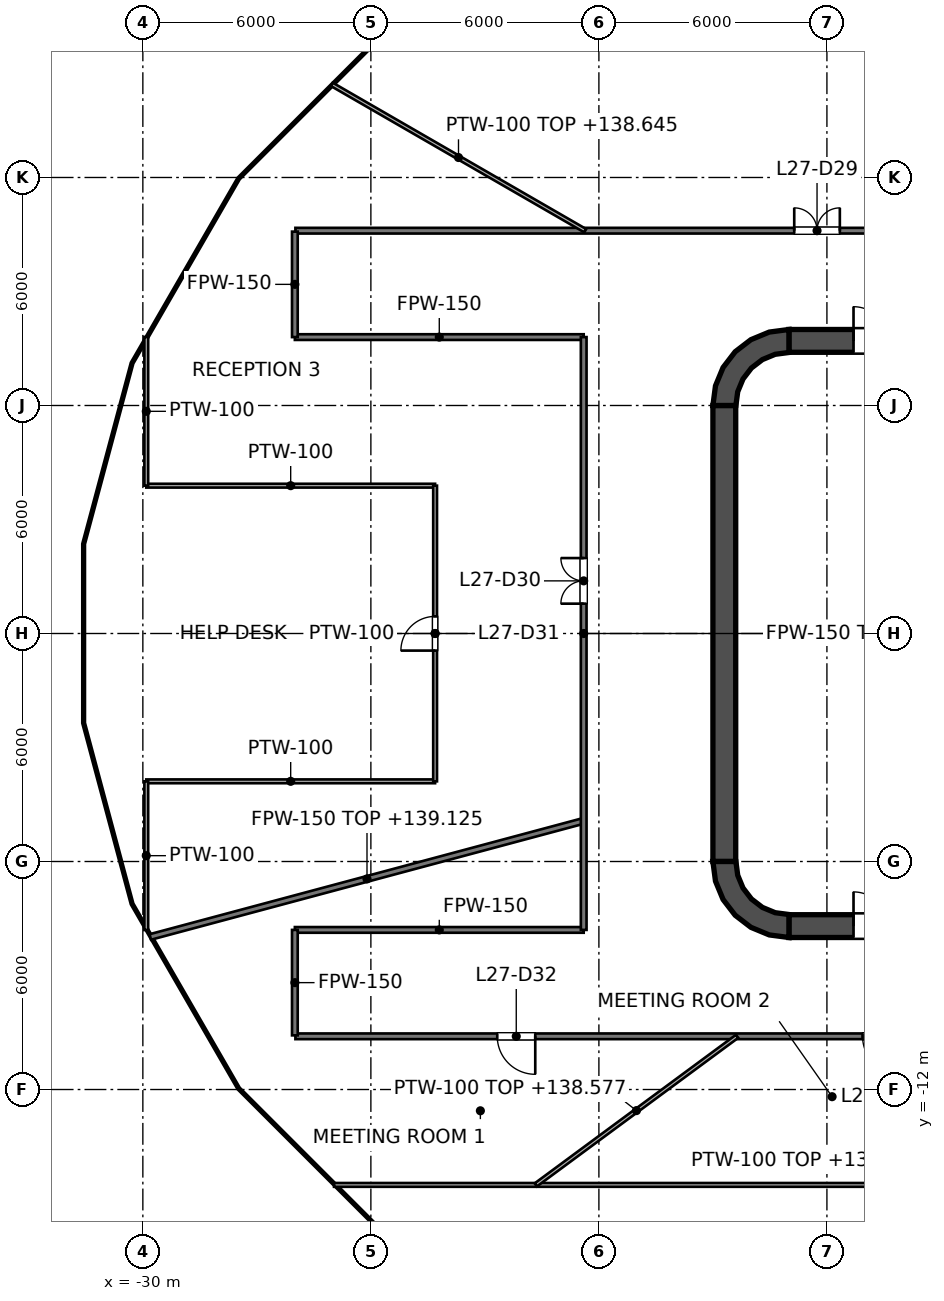
"""IFC4 building model, lengths in metres.
Left out: names, types, materials, properties, quantities, classifications, styles, units other than length and angle.
Written with IfcOpenShell. Run it as: python <this file> out.ifc"""

import sys

from ifc_helpers import new_model, si_unit, direction, frame, frame_2d, origin, place, context, subcontext, project, spatial, polyline, rectangle, outline, extrude, element, fill, save


model = new_model("IFC4")
c1 = context("Model", 3, precision=1e-05, world=origin(), true_north=direction((0.0, 1.0)))
c2 = subcontext(c1, "Body", "Model", "MODEL_VIEW")
j1 = project(units=[si_unit("LENGTHUNIT", "METRE"), si_unit("PLANEANGLEUNIT", "RADIAN")], contexts=[c1])
p1 = place(None, origin())
s1 = spatial("IfcSite", under=j1, at=p1, CompositionType="ELEMENT")
p2 = place(p1, origin())
s2 = spatial("IfcBuilding", under=s1, at=p2, CompositionType="ELEMENT")
p3 = place(p2, frame((0.0, 0.0, 135.6)))
s3 = spatial("IfcBuildingStorey", under=s2, at=p3, CompositionType="ELEMENT", Elevation=135.6)
p4 = place(p3, frame((-13.0, 7.7, 0.0), z_axis=(0.0, 0.0, 1.0), x_axis=(1.0, 0.0, 0.0)))
e1 = element("IfcWall", 1, at=p4, inside=s3, PredefinedType="SHEAR", context=c2, shape_type="SweptSolid", body=[
    extrude(rectangle(XDim=26.0, YDim=0.6, at=frame_2d((13.0, 0.0))), origin(), (0.0, 0.0, 1.0), 4.2),
])
p5 = place(p4, frame((1.7, 0.0, 0.0)))
e2 = element("IfcOpeningElement", 2, at=p5, cuts=e1, PredefinedType="OPENING", context=c2, shape_type="SweptSolid", body=[
    extrude(rectangle(XDim=1.8, YDim=2.1, at=frame_2d((0.9, 1.05))), frame((0.0, 0.3, 0.0), z_axis=(0.0, -1.0, 0.0), x_axis=(1.0, 0.0, 0.0)), (0.0, 0.0, 1.0), 0.6),
])
p6 = place(p4, frame((22.5, 0.0, 0.0)))
e3 = element("IfcOpeningElement", 3, at=p6, cuts=e1, PredefinedType="OPENING", context=c2, shape_type="SweptSolid", body=[
    extrude(rectangle(XDim=1.8, YDim=2.1, at=frame_2d((0.9, 1.05))), frame((0.0, 0.3, 0.0), z_axis=(0.0, -1.0, 0.0), x_axis=(1.0, 0.0, 0.0)), (0.0, 0.0, 1.0), 0.6),
])
p7 = place(p3, frame((-13.0, -7.7, 0.0), z_axis=(0.0, 0.0, 1.0), x_axis=(1.0, 0.0, 0.0)))
e4 = element("IfcWall", 4, at=p7, inside=s3, PredefinedType="SHEAR", context=c2, shape_type="SweptSolid", body=[
    extrude(rectangle(XDim=26.0, YDim=0.6, at=frame_2d((13.0, 0.0))), origin(), (0.0, 0.0, 1.0), 4.2),
])
p8 = place(p7, frame((1.7, 0.0, 0.0)))
e5 = element("IfcOpeningElement", 5, at=p8, cuts=e4, PredefinedType="OPENING", context=c2, shape_type="SweptSolid", body=[
    extrude(rectangle(XDim=1.8, YDim=2.1, at=frame_2d((0.9, 1.05))), frame((0.0, 0.3, 0.0), z_axis=(0.0, -1.0, 0.0), x_axis=(1.0, 0.0, 0.0)), (0.0, 0.0, 1.0), 0.6),
])
p9 = place(p7, frame((22.5, 0.0, 0.0)))
e6 = element("IfcOpeningElement", 6, at=p9, cuts=e4, PredefinedType="OPENING", context=c2, shape_type="SweptSolid", body=[
    extrude(rectangle(XDim=1.8, YDim=2.1, at=frame_2d((0.9, 1.05))), frame((0.0, 0.3, 0.0), z_axis=(0.0, -1.0, 0.0), x_axis=(1.0, 0.0, 0.0)), (0.0, 0.0, 1.0), 0.6),
])
p10 = place(p3, frame((-14.7, -6.0, 0.0), z_axis=(0.0, 0.0, 1.0), x_axis=(0.0, 1.0, 0.0)))
e7 = element("IfcWall", 7, at=p10, inside=s3, PredefinedType="SHEAR", context=c2, shape_type="SweptSolid", body=[
    extrude(rectangle(XDim=12.0, YDim=0.6, at=frame_2d((6.0, 0.0))), origin(), (0.0, 0.0, 1.0), 4.2),
])
p11 = place(p3, origin())
e8 = element("IfcWall", 8, at=p11, inside=s3, PredefinedType="SHEAR", context=c2, shape_type="SweptSolid", body=[
    extrude(outline(polyline([(-15.0, 6.0), (-14.395, 6.0), (-14.347, 6.361), (-14.208, 6.698), (-13.986, 6.986), (-13.698, 7.208), (-13.361, 7.347), (-13.0, 7.395), (-13.0, 8.0), (-13.518, 7.932), (-14.0, 7.732), (-14.414, 7.414), (-14.732, 7.0), (-14.932, 6.518), (-15.0, 6.0)])), origin(), (0.0, 0.0, 1.0), 4.2),
])
e9 = element("IfcWall", 9, at=p11, inside=s3, PredefinedType="SHEAR", context=c2, shape_type="SweptSolid", body=[
    extrude(outline(polyline([(-13.0, -8.0), (-13.0, -7.395), (-13.361, -7.347), (-13.698, -7.208), (-13.986, -6.986), (-14.208, -6.698), (-14.347, -6.361), (-14.395, -6.0), (-15.0, -6.0), (-14.932, -6.518), (-14.732, -7.0), (-14.414, -7.414), (-14.0, -7.732), (-13.518, -7.932), (-13.0, -8.0)])), origin(), (0.0, 0.0, 1.0), 4.2),
])
p12 = place(p3, frame((-11.8, -7.4, 0.0), z_axis=(0.0, 0.0, 1.0), x_axis=(0.0, 1.0, 0.0)))
e10 = element("IfcWall", 10, at=p12, inside=s3, PredefinedType="SOLIDWALL", context=c2, shape_type="SweptSolid", body=[
    extrude(rectangle(XDim=14.8, YDim=0.4, at=frame_2d((7.4, 0.0))), origin(), (0.0, 0.0, 1.0), 4.05),
])
p13 = place(p12, frame((11.2, 0.0, 0.0)))
e11 = element("IfcOpeningElement", 11, at=p13, cuts=e10, PredefinedType="OPENING", context=c2, shape_type="SweptSolid", body=[
    extrude(rectangle(XDim=1.1, YDim=2.1, at=frame_2d((0.55, 1.05))), frame((0.0, 0.2, 0.0), z_axis=(0.0, -1.0, 0.0), x_axis=(1.0, 0.0, 0.0)), (0.0, 0.0, 1.0), 0.4),
])
p14 = place(p12, frame((8.3, 0.0, 0.0)))
e12 = element("IfcOpeningElement", 12, at=p14, cuts=e10, PredefinedType="OPENING", context=c2, shape_type="SweptSolid", body=[
    extrude(rectangle(XDim=1.1, YDim=2.1, at=frame_2d((0.55, 1.05))), frame((0.0, 0.2, 0.0), z_axis=(0.0, -1.0, 0.0), x_axis=(1.0, 0.0, 0.0)), (0.0, 0.0, 1.0), 0.4),
])
p15 = place(p12, frame((5.4, 0.0, 0.0)))
e13 = element("IfcOpeningElement", 13, at=p15, cuts=e10, PredefinedType="OPENING", context=c2, shape_type="SweptSolid", body=[
    extrude(rectangle(XDim=1.1, YDim=2.1, at=frame_2d((0.55, 1.05))), frame((0.0, 0.2, 0.0), z_axis=(0.0, -1.0, 0.0), x_axis=(1.0, 0.0, 0.0)), (0.0, 0.0, 1.0), 0.4),
])
p16 = place(p12, frame((13.552, 0.0, 0.0)))
e14 = element("IfcOpeningElement", 14, at=p16, cuts=e10, PredefinedType="OPENING", context=c2, shape_type="SweptSolid", body=[
    extrude(rectangle(XDim=0.9, YDim=2.1, at=frame_2d((0.45, 1.05))), frame((0.0, 0.2, 0.0), z_axis=(0.0, -1.0, 0.0), x_axis=(1.0, 0.0, 0.0)), (0.0, 0.0, 1.0), 0.4),
])
p17 = place(p12, frame((0.347, 0.0, 0.0)))
e15 = element("IfcOpeningElement", 15, at=p17, cuts=e10, PredefinedType="OPENING", context=c2, shape_type="SweptSolid", body=[
    extrude(rectangle(XDim=0.9, YDim=2.1, at=frame_2d((0.45, 1.05))), frame((0.0, 0.2, 0.0), z_axis=(0.0, -1.0, 0.0), x_axis=(1.0, 0.0, 0.0)), (0.0, 0.0, 1.0), 0.4),
])
e16 = element("IfcWall", 16, at=p11, inside=s3, PredefinedType="SOLIDWALL", context=c2, shape_type="SweptSolid", body=[
    extrude(outline(polyline([(-12.0, -5.925), (-12.0, -5.675), (-14.15, -5.675), (-14.15, -3.025), (-12.0, -3.025), (-12.0, -2.775), (-14.15, -2.775), (-14.15, -0.125), (-12.0, -0.125), (-12.0, 0.125), (-14.15, 0.125), (-14.15, 2.775), (-12.0, 2.775), (-12.0, 3.025), (-14.15, 3.025), (-14.15, 5.675), (-12.0, 5.675), (-12.0, 5.925), (-14.15, 5.925), (-14.4, 5.925), (-14.4, 5.675), (-14.4, 3.025), (-14.4, 2.775), (-14.4, 0.125), (-14.4, -0.125), (-14.4, -2.775), (-14.4, -3.025), (-14.4, -5.675), (-14.4, -5.925), (-14.15, -5.925), (-12.0, -5.925)])), origin(), (0.0, 0.0, 1.0), 4.05),
])
p18 = place(p3, frame((-12.581, 21.79, 0.0), z_axis=(0.0, 0.0, 1.0), x_axis=(0.500038653944, -0.866003085769, 0.0)))
e17 = element("IfcWall", 17, at=p18, inside=s3, PredefinedType="PARTITIONING", context=c2, shape_type="SweptSolid", body=[
    extrude(rectangle(XDim=12.921, YDim=0.15, at=frame_2d((6.461, 0.0))), origin(), (0.0, 0.0, 1.0), 3.277),
])
p19 = place(p3, frame((-25.986, -10.6, 0.0), z_axis=(0.0, 0.0, 1.0), x_axis=(1.0, 0.0, 0.0)))
e18 = element("IfcWall", 18, at=p19, inside=s3, PredefinedType="PARTITIONING", context=c2, shape_type="SweptSolid", body=[
    extrude(rectangle(XDim=51.972, YDim=0.15, at=frame_2d((25.986, 0.0))), origin(), (0.0, 0.0, 1.0), 2.968),
])
p20 = place(p19, frame((47.628, 0.0, 0.0)))
e19 = element("IfcOpeningElement", 19, at=p20, cuts=e18, PredefinedType="OPENING", context=c2, shape_type="SweptSolid", body=[
    extrude(rectangle(XDim=1.0, YDim=2.1, at=frame_2d((0.5, 1.05))), frame((0.0, 0.075, 0.0), z_axis=(0.0, -1.0, 0.0), x_axis=(1.0, 0.0, 0.0)), (0.0, 0.0, 1.0), 0.15),
])
p21 = place(p19, frame((5.312, 0.0, 0.0)))
e20 = element("IfcOpeningElement", 20, at=p21, cuts=e18, PredefinedType="OPENING", context=c2, shape_type="SweptSolid", body=[
    extrude(rectangle(XDim=1.0, YDim=2.1, at=frame_2d((0.5, 1.05))), frame((0.0, 0.075, 0.0), z_axis=(0.0, -1.0, 0.0), x_axis=(1.0, 0.0, 0.0)), (0.0, 0.0, 1.0), 0.15),
])
p22 = place(p19, frame((14.924, 0.0, 0.0)))
e21 = element("IfcOpeningElement", 21, at=p22, cuts=e18, PredefinedType="OPENING", context=c2, shape_type="SweptSolid", body=[
    extrude(rectangle(XDim=1.0, YDim=2.1, at=frame_2d((0.5, 1.05))), frame((0.0, 0.075, 0.0), z_axis=(0.0, -1.0, 0.0), x_axis=(1.0, 0.0, 0.0)), (0.0, 0.0, 1.0), 0.15),
])
p23 = place(p19, frame((22.156, 0.0, 0.0)))
e22 = element("IfcOpeningElement", 22, at=p23, cuts=e18, PredefinedType="OPENING", context=c2, shape_type="SweptSolid", body=[
    extrude(rectangle(XDim=1.0, YDim=2.1, at=frame_2d((0.5, 1.05))), frame((0.0, 0.075, 0.0), z_axis=(0.0, -1.0, 0.0), x_axis=(1.0, 0.0, 0.0)), (0.0, 0.0, 1.0), 0.15),
])
p24 = place(p19, frame((27.795, 0.0, 0.0)))
e23 = element("IfcOpeningElement", 23, at=p24, cuts=e18, PredefinedType="OPENING", context=c2, shape_type="SweptSolid", body=[
    extrude(rectangle(XDim=1.0, YDim=2.1, at=frame_2d((0.5, 1.05))), frame((0.0, 0.075, 0.0), z_axis=(0.0, -1.0, 0.0), x_axis=(1.0, 0.0, 0.0)), (0.0, 0.0, 1.0), 0.15),
])
p25 = place(p19, frame((37.045, 0.0, 0.0)))
e24 = element("IfcOpeningElement", 24, at=p25, cuts=e18, PredefinedType="OPENING", context=c2, shape_type="SweptSolid", body=[
    extrude(rectangle(XDim=1.0, YDim=2.1, at=frame_2d((0.5, 1.05))), frame((0.0, 0.075, 0.0), z_axis=(0.0, -1.0, 0.0), x_axis=(1.0, 0.0, 0.0)), (0.0, 0.0, 1.0), 0.15),
])
for number, where, z_axis, x_axis in (
    (25, (-26.0, -7.8, 0.0), (0.0, 0.0, 1.0), (1.0, 0.0, 0.0)),
    (26, (-26.0, 7.8, 0.0), (0.0, 0.0, 1.0), (1.0, 0.0, 0.0)),
):
    element("IfcWall", number, at=place(p3, frame(where, z_axis=z_axis, x_axis=x_axis)), inside=s3, PredefinedType="PARTITIONING", context=c2, shape_type="SweptSolid", body=[
        extrude(rectangle(XDim=7.6, YDim=0.15, at=frame_2d((3.8, 0.0))), origin(), (0.0, 0.0, 1.0), 2.977),
    ])
p26 = place(p3, frame((-25.986, 10.6, 0.0), z_axis=(0.0, 0.0, 1.0), x_axis=(1.0, 0.0, 0.0)))
e27 = element("IfcWall", 27, at=p26, inside=s3, PredefinedType="PARTITIONING", context=c2, shape_type="SweptSolid", body=[
    extrude(rectangle(XDim=51.972, YDim=0.15, at=frame_2d((25.986, 0.0))), origin(), (0.0, 0.0, 1.0), 2.968),
])
p27 = place(p26, frame((42.031, 0.0, 0.0)))
e28 = element("IfcOpeningElement", 28, at=p27, cuts=e27, PredefinedType="OPENING", context=c2, shape_type="SweptSolid", body=[
    extrude(rectangle(XDim=1.0, YDim=2.1, at=frame_2d((0.5, 1.05))), frame((0.0, 0.075, 0.0), z_axis=(0.0, -1.0, 0.0), x_axis=(1.0, 0.0, 0.0)), (0.0, 0.0, 1.0), 0.15),
])
p28 = place(p26, frame((37.69, 0.0, 0.0)))
e29 = element("IfcOpeningElement", 29, at=p28, cuts=e27, PredefinedType="OPENING", context=c2, shape_type="SweptSolid", body=[
    extrude(rectangle(XDim=1.0, YDim=2.1, at=frame_2d((0.5, 1.05))), frame((0.0, 0.075, 0.0), z_axis=(0.0, -1.0, 0.0), x_axis=(1.0, 0.0, 0.0)), (0.0, 0.0, 1.0), 0.15),
])
p29 = place(p26, frame((32.156, 0.0, 0.0)))
e30 = element("IfcOpeningElement", 30, at=p29, cuts=e27, PredefinedType="OPENING", context=c2, shape_type="SweptSolid", body=[
    extrude(rectangle(XDim=1.0, YDim=2.1, at=frame_2d((0.5, 1.05))), frame((0.0, 0.075, 0.0), z_axis=(0.0, -1.0, 0.0), x_axis=(1.0, 0.0, 0.0)), (0.0, 0.0, 1.0), 0.15),
])
p30 = place(p26, frame((23.896, 0.0, 0.0)))
e31 = element("IfcOpeningElement", 31, at=p30, cuts=e27, PredefinedType="OPENING", context=c2, shape_type="SweptSolid", body=[
    extrude(rectangle(XDim=1.0, YDim=2.1, at=frame_2d((0.5, 1.05))), frame((0.0, 0.075, 0.0), z_axis=(0.0, -1.0, 0.0), x_axis=(1.0, 0.0, 0.0)), (0.0, 0.0, 1.0), 0.15),
])
p31 = place(p26, frame((13.126, 0.0, 0.0)))
e32 = element("IfcOpeningElement", 32, at=p31, cuts=e27, PredefinedType="OPENING", context=c2, shape_type="SweptSolid", body=[
    extrude(rectangle(XDim=1.2, YDim=2.1, at=frame_2d((0.6, 1.05))), frame((0.0, 0.075, 0.0), z_axis=(0.0, -1.0, 0.0), x_axis=(1.0, 0.0, 0.0)), (0.0, 0.0, 1.0), 0.15),
])
p32 = place(p3, frame((-29.804, -7.986, 0.0), z_axis=(0.0, 0.0, 1.0), x_axis=(0.965916389644, 0.258854260572, 0.0)))
e33 = element("IfcWall", 33, at=p32, inside=s3, PredefinedType="PARTITIONING", context=c2, shape_type="SweptSolid", body=[
    extrude(rectangle(XDim=11.806, YDim=0.15, at=frame_2d((5.903, 0.0))), origin(), (0.0, 0.0, 1.0), 3.525),
])
p33 = place(p3, frame((-18.4, -7.8, 0.0), z_axis=(0.0, 0.0, 1.0), x_axis=(0.0, 1.0, 0.0)))
e34 = element("IfcWall", 34, at=p33, inside=s3, PredefinedType="PARTITIONING", context=c2, shape_type="SweptSolid", body=[
    extrude(rectangle(XDim=15.6, YDim=0.15, at=frame_2d((7.8, 0.0))), origin(), (0.0, 0.0, 1.0), 2.968),
])
p34 = place(p33, frame((8.585, 0.0, 0.0)))
e35 = element("IfcOpeningElement", 35, at=p34, cuts=e34, PredefinedType="OPENING", context=c2, shape_type="SweptSolid", body=[
    extrude(rectangle(XDim=1.2, YDim=2.1, at=frame_2d((0.6, 1.05))), frame((0.0, 0.075, 0.0), z_axis=(0.0, -1.0, 0.0), x_axis=(1.0, 0.0, 0.0)), (0.0, 0.0, 1.0), 0.15),
])
for number, where, z_axis, x_axis in (
    (36, (-26.0, -10.575, 0.0), (0.0, 0.0, 1.0), (0.0, 1.0, 0.0)),
    (37, (-26.0, 7.8, 0.0), (0.0, 0.0, 1.0), (0.0, 1.0, 0.0)),
):
    element("IfcWall", number, at=place(p3, frame(where, z_axis=z_axis, x_axis=x_axis)), inside=s3, PredefinedType="PARTITIONING", context=c2, shape_type="SweptSolid", body=[
        extrude(rectangle(XDim=2.775, YDim=0.15, at=frame_2d((1.387, 0.0))), origin(), (0.0, 0.0, 1.0), 2.977),
    ])
p35 = place(p3, frame((-25.029, 14.451, 0.0), z_axis=(0.0, 0.0, 1.0), x_axis=(0.865996573404, -0.500049932359, 0.0)))
e38 = element("IfcWall", 38, at=p35, inside=s3, PredefinedType="PARTITIONING", context=c2, shape_type="SweptSolid", body=[
    extrude(rectangle(XDim=7.701, YDim=0.1, at=frame_2d((3.851, 0.0))), origin(), (0.0, 0.0, 1.0), 3.045),
])
p36 = place(p3, frame((-24.97, -14.51, 0.0), z_axis=(0.0, 0.0, 1.0), x_axis=(1.0, 0.0, 0.0)))
e39 = element("IfcWall", 39, at=p36, inside=s3, PredefinedType="PARTITIONING", context=c2, shape_type="SweptSolid", body=[
    extrude(rectangle(XDim=49.94, YDim=0.1, at=frame_2d((24.97, 0.0))), origin(), (0.0, 0.0, 1.0), 2.968),
])
p37 = place(p36, frame((19.461, 0.0, 0.0)))
e40 = element("IfcOpeningElement", 40, at=p37, cuts=e39, PredefinedType="OPENING", context=c2, shape_type="SweptSolid", body=[
    extrude(rectangle(XDim=1.8, YDim=2.1, at=frame_2d((0.9, 1.05))), frame((0.0, 0.05, 0.0), z_axis=(0.0, -1.0, 0.0), x_axis=(1.0, 0.0, 0.0)), (0.0, 0.0, 1.0), 0.1),
])
p38 = place(p36, frame((39.835, 0.0, 0.0)))
e41 = element("IfcOpeningElement", 41, at=p38, cuts=e39, PredefinedType="OPENING", context=c2, shape_type="SweptSolid", body=[
    extrude(rectangle(XDim=1.8, YDim=2.1, at=frame_2d((0.9, 1.05))), frame((0.0, 0.05, 0.0), z_axis=(0.0, -1.0, 0.0), x_axis=(1.0, 0.0, 0.0)), (0.0, 0.0, 1.0), 0.1),
])
for number, where, z_axis, x_axis in (
    (42, (-29.91, -3.89, 0.0), (0.0, 0.0, 1.0), (1.0, 0.0, 0.0)),
    (43, (-29.91, 3.89, 0.0), (0.0, 0.0, 1.0), (1.0, 0.0, 0.0)),
):
    element("IfcWall", number, at=place(p3, frame(where, z_axis=z_axis, x_axis=x_axis)), inside=s3, PredefinedType="PARTITIONING", context=c2, shape_type="SweptSolid", body=[
        extrude(rectangle(XDim=7.6, YDim=0.1, at=frame_2d((3.8, 0.0))), origin(), (0.0, 0.0, 1.0), 2.968),
    ])
p39 = place(p3, frame((-19.661, -14.51, 0.0), z_axis=(0.0, 0.0, 1.0), x_axis=(0.804603605329, 0.593812292136, 0.0)))
e44 = element("IfcWall", 44, at=p39, inside=s3, PredefinedType="PARTITIONING", context=c2, shape_type="SweptSolid", body=[
    extrude(rectangle(XDim=6.584, YDim=0.1, at=frame_2d((3.292, 0.0))), origin(), (0.0, 0.0, 1.0), 2.977),
])
p40 = place(p3, frame((-22.31, -3.89, 0.0), z_axis=(0.0, 0.0, 1.0), x_axis=(0.0, 1.0, 0.0)))
e45 = element("IfcWall", 45, at=p40, inside=s3, PredefinedType="PARTITIONING", context=c2, shape_type="SweptSolid", body=[
    extrude(rectangle(XDim=7.78, YDim=0.1, at=frame_2d((3.89, 0.0))), origin(), (0.0, 0.0, 1.0), 2.968),
])
p41 = place(p40, frame((3.44, 0.0, 0.0)))
e46 = element("IfcOpeningElement", 46, at=p41, cuts=e45, PredefinedType="OPENING", context=c2, shape_type="SweptSolid", body=[
    extrude(rectangle(XDim=0.9, YDim=2.1, at=frame_2d((0.45, 1.05))), frame((0.0, 0.05, 0.0), z_axis=(0.0, -1.0, 0.0), x_axis=(1.0, 0.0, 0.0)), (0.0, 0.0, 1.0), 0.1),
])
for number, where, z_axis, x_axis in (
    (47, (-29.91, -7.803, 0.0), (0.0, 0.0, 1.0), (0.0, 1.0, 0.0)),
    (48, (-29.91, 3.89, 0.0), (0.0, 0.0, 1.0), (0.0, 1.0, 0.0)),
):
    element("IfcWall", number, at=place(p3, frame(where, z_axis=z_axis, x_axis=x_axis)), inside=s3, PredefinedType="PARTITIONING", context=c2, shape_type="SweptSolid", body=[
        extrude(rectangle(XDim=3.913, YDim=0.1, at=frame_2d((1.957, 0.0))), origin(), (0.0, 0.0, 1.0), 2.968),
    ])
p42 = place(p13, origin())
e49 = element("IfcDoor", 49, at=p42, inside=s3, OperationType="DOUBLE_DOOR_SLIDING", PredefinedType="DOOR", context=c2, shape_type="SweptSolid", body=[
    extrude(rectangle(XDim=1.1, YDim=2.1, at=frame_2d((0.55, 1.05))), frame((0.0, 0.025, 0.0), z_axis=(0.0, -1.0, 0.0), x_axis=(1.0, 0.0, 0.0)), (0.0, 0.0, 1.0), 0.05),
])
fill(e11, e49)
p43 = place(p14, origin())
e50 = element("IfcDoor", 50, at=p43, inside=s3, OperationType="DOUBLE_DOOR_SLIDING", PredefinedType="DOOR", context=c2, shape_type="SweptSolid", body=[
    extrude(rectangle(XDim=1.1, YDim=2.1, at=frame_2d((0.55, 1.05))), frame((0.0, 0.025, 0.0), z_axis=(0.0, -1.0, 0.0), x_axis=(1.0, 0.0, 0.0)), (0.0, 0.0, 1.0), 0.05),
])
fill(e12, e50)
p44 = place(p15, origin())
e51 = element("IfcDoor", 51, at=p44, inside=s3, OperationType="DOUBLE_DOOR_SLIDING", PredefinedType="DOOR", context=c2, shape_type="SweptSolid", body=[
    extrude(rectangle(XDim=1.1, YDim=2.1, at=frame_2d((0.55, 1.05))), frame((0.0, 0.025, 0.0), z_axis=(0.0, -1.0, 0.0), x_axis=(1.0, 0.0, 0.0)), (0.0, 0.0, 1.0), 0.05),
])
fill(e13, e51)
p45 = place(p16, origin())
e52 = element("IfcDoor", 52, at=p45, inside=s3, OperationType="SINGLE_SWING_LEFT", PredefinedType="DOOR", context=c2, shape_type="SweptSolid", body=[
    extrude(rectangle(XDim=0.9, YDim=2.1, at=frame_2d((0.45, 1.05))), frame((0.0, 0.025, 0.0), z_axis=(0.0, -1.0, 0.0), x_axis=(1.0, 0.0, 0.0)), (0.0, 0.0, 1.0), 0.05),
])
fill(e14, e52)
p46 = place(p17, origin())
e53 = element("IfcDoor", 53, at=p46, inside=s3, OperationType="SINGLE_SWING_LEFT", PredefinedType="DOOR", context=c2, shape_type="SweptSolid", body=[
    extrude(rectangle(XDim=0.9, YDim=2.1, at=frame_2d((0.45, 1.05))), frame((0.0, 0.025, 0.0), z_axis=(0.0, -1.0, 0.0), x_axis=(1.0, 0.0, 0.0)), (0.0, 0.0, 1.0), 0.05),
])
fill(e15, e53)
p47 = place(p5, origin())
e54 = element("IfcDoor", 54, at=p47, inside=s3, OperationType="DOUBLE_DOOR_SINGLE_SWING", PredefinedType="DOOR", context=c2, shape_type="SweptSolid", body=[
    extrude(rectangle(XDim=1.8, YDim=2.1, at=frame_2d((0.9, 1.05))), frame((0.0, 0.025, 0.0), z_axis=(0.0, -1.0, 0.0), x_axis=(1.0, 0.0, 0.0)), (0.0, 0.0, 1.0), 0.05),
])
fill(e2, e54)
p48 = place(p8, origin())
e55 = element("IfcDoor", 55, at=p48, inside=s3, OperationType="DOUBLE_DOOR_SINGLE_SWING", PredefinedType="DOOR", context=c2, shape_type="SweptSolid", body=[
    extrude(rectangle(XDim=1.8, YDim=2.1, at=frame_2d((0.9, 1.05))), frame((0.0, 0.025, 0.0), z_axis=(0.0, -1.0, 0.0), x_axis=(1.0, 0.0, 0.0)), (0.0, 0.0, 1.0), 0.05),
])
fill(e5, e55)
p49 = place(p31, origin())
e56 = element("IfcDoor", 56, at=p49, inside=s3, OperationType="DOUBLE_DOOR_SINGLE_SWING", PredefinedType="DOOR", context=c2, shape_type="SweptSolid", body=[
    extrude(rectangle(XDim=1.2, YDim=2.1, at=frame_2d((0.6, 1.05))), frame((0.0, 0.025, 0.0), z_axis=(0.0, -1.0, 0.0), x_axis=(1.0, 0.0, 0.0)), (0.0, 0.0, 1.0), 0.05),
])
fill(e32, e56)
p50 = place(p34, origin())
e57 = element("IfcDoor", 57, at=p50, inside=s3, OperationType="DOUBLE_DOOR_SINGLE_SWING", PredefinedType="DOOR", context=c2, shape_type="SweptSolid", body=[
    extrude(rectangle(XDim=1.2, YDim=2.1, at=frame_2d((0.6, 1.05))), frame((0.0, 0.025, 0.0), z_axis=(0.0, -1.0, 0.0), x_axis=(1.0, 0.0, 0.0)), (0.0, 0.0, 1.0), 0.05),
])
fill(e35, e57)
p51 = place(p41, origin())
e58 = element("IfcDoor", 58, at=p51, inside=s3, OperationType="SINGLE_SWING_LEFT", PredefinedType="DOOR", context=c2, shape_type="SweptSolid", body=[
    extrude(rectangle(XDim=0.9, YDim=2.1, at=frame_2d((0.45, 1.05))), frame((0.0, 0.025, 0.0), z_axis=(0.0, -1.0, 0.0), x_axis=(1.0, 0.0, 0.0)), (0.0, 0.0, 1.0), 0.05),
])
fill(e46, e58)
p52 = place(p21, origin())
e59 = element("IfcDoor", 59, at=p52, inside=s3, OperationType="SINGLE_SWING_RIGHT", PredefinedType="DOOR", context=c2, shape_type="SweptSolid", body=[
    extrude(rectangle(XDim=1.0, YDim=2.1, at=frame_2d((0.5, 1.05))), frame((0.0, 0.025, 0.0), z_axis=(0.0, -1.0, 0.0), x_axis=(1.0, 0.0, 0.0)), (0.0, 0.0, 1.0), 0.05),
])
fill(e20, e59)
p53 = place(p22, origin())
e60 = element("IfcDoor", 60, at=p53, inside=s3, OperationType="SINGLE_SWING_RIGHT", PredefinedType="DOOR", context=c2, shape_type="SweptSolid", body=[
    extrude(rectangle(XDim=1.0, YDim=2.1, at=frame_2d((0.5, 1.05))), frame((0.0, 0.025, 0.0), z_axis=(0.0, -1.0, 0.0), x_axis=(1.0, 0.0, 0.0)), (0.0, 0.0, 1.0), 0.05),
])
fill(e21, e60)
save(model, sys.argv[1])
